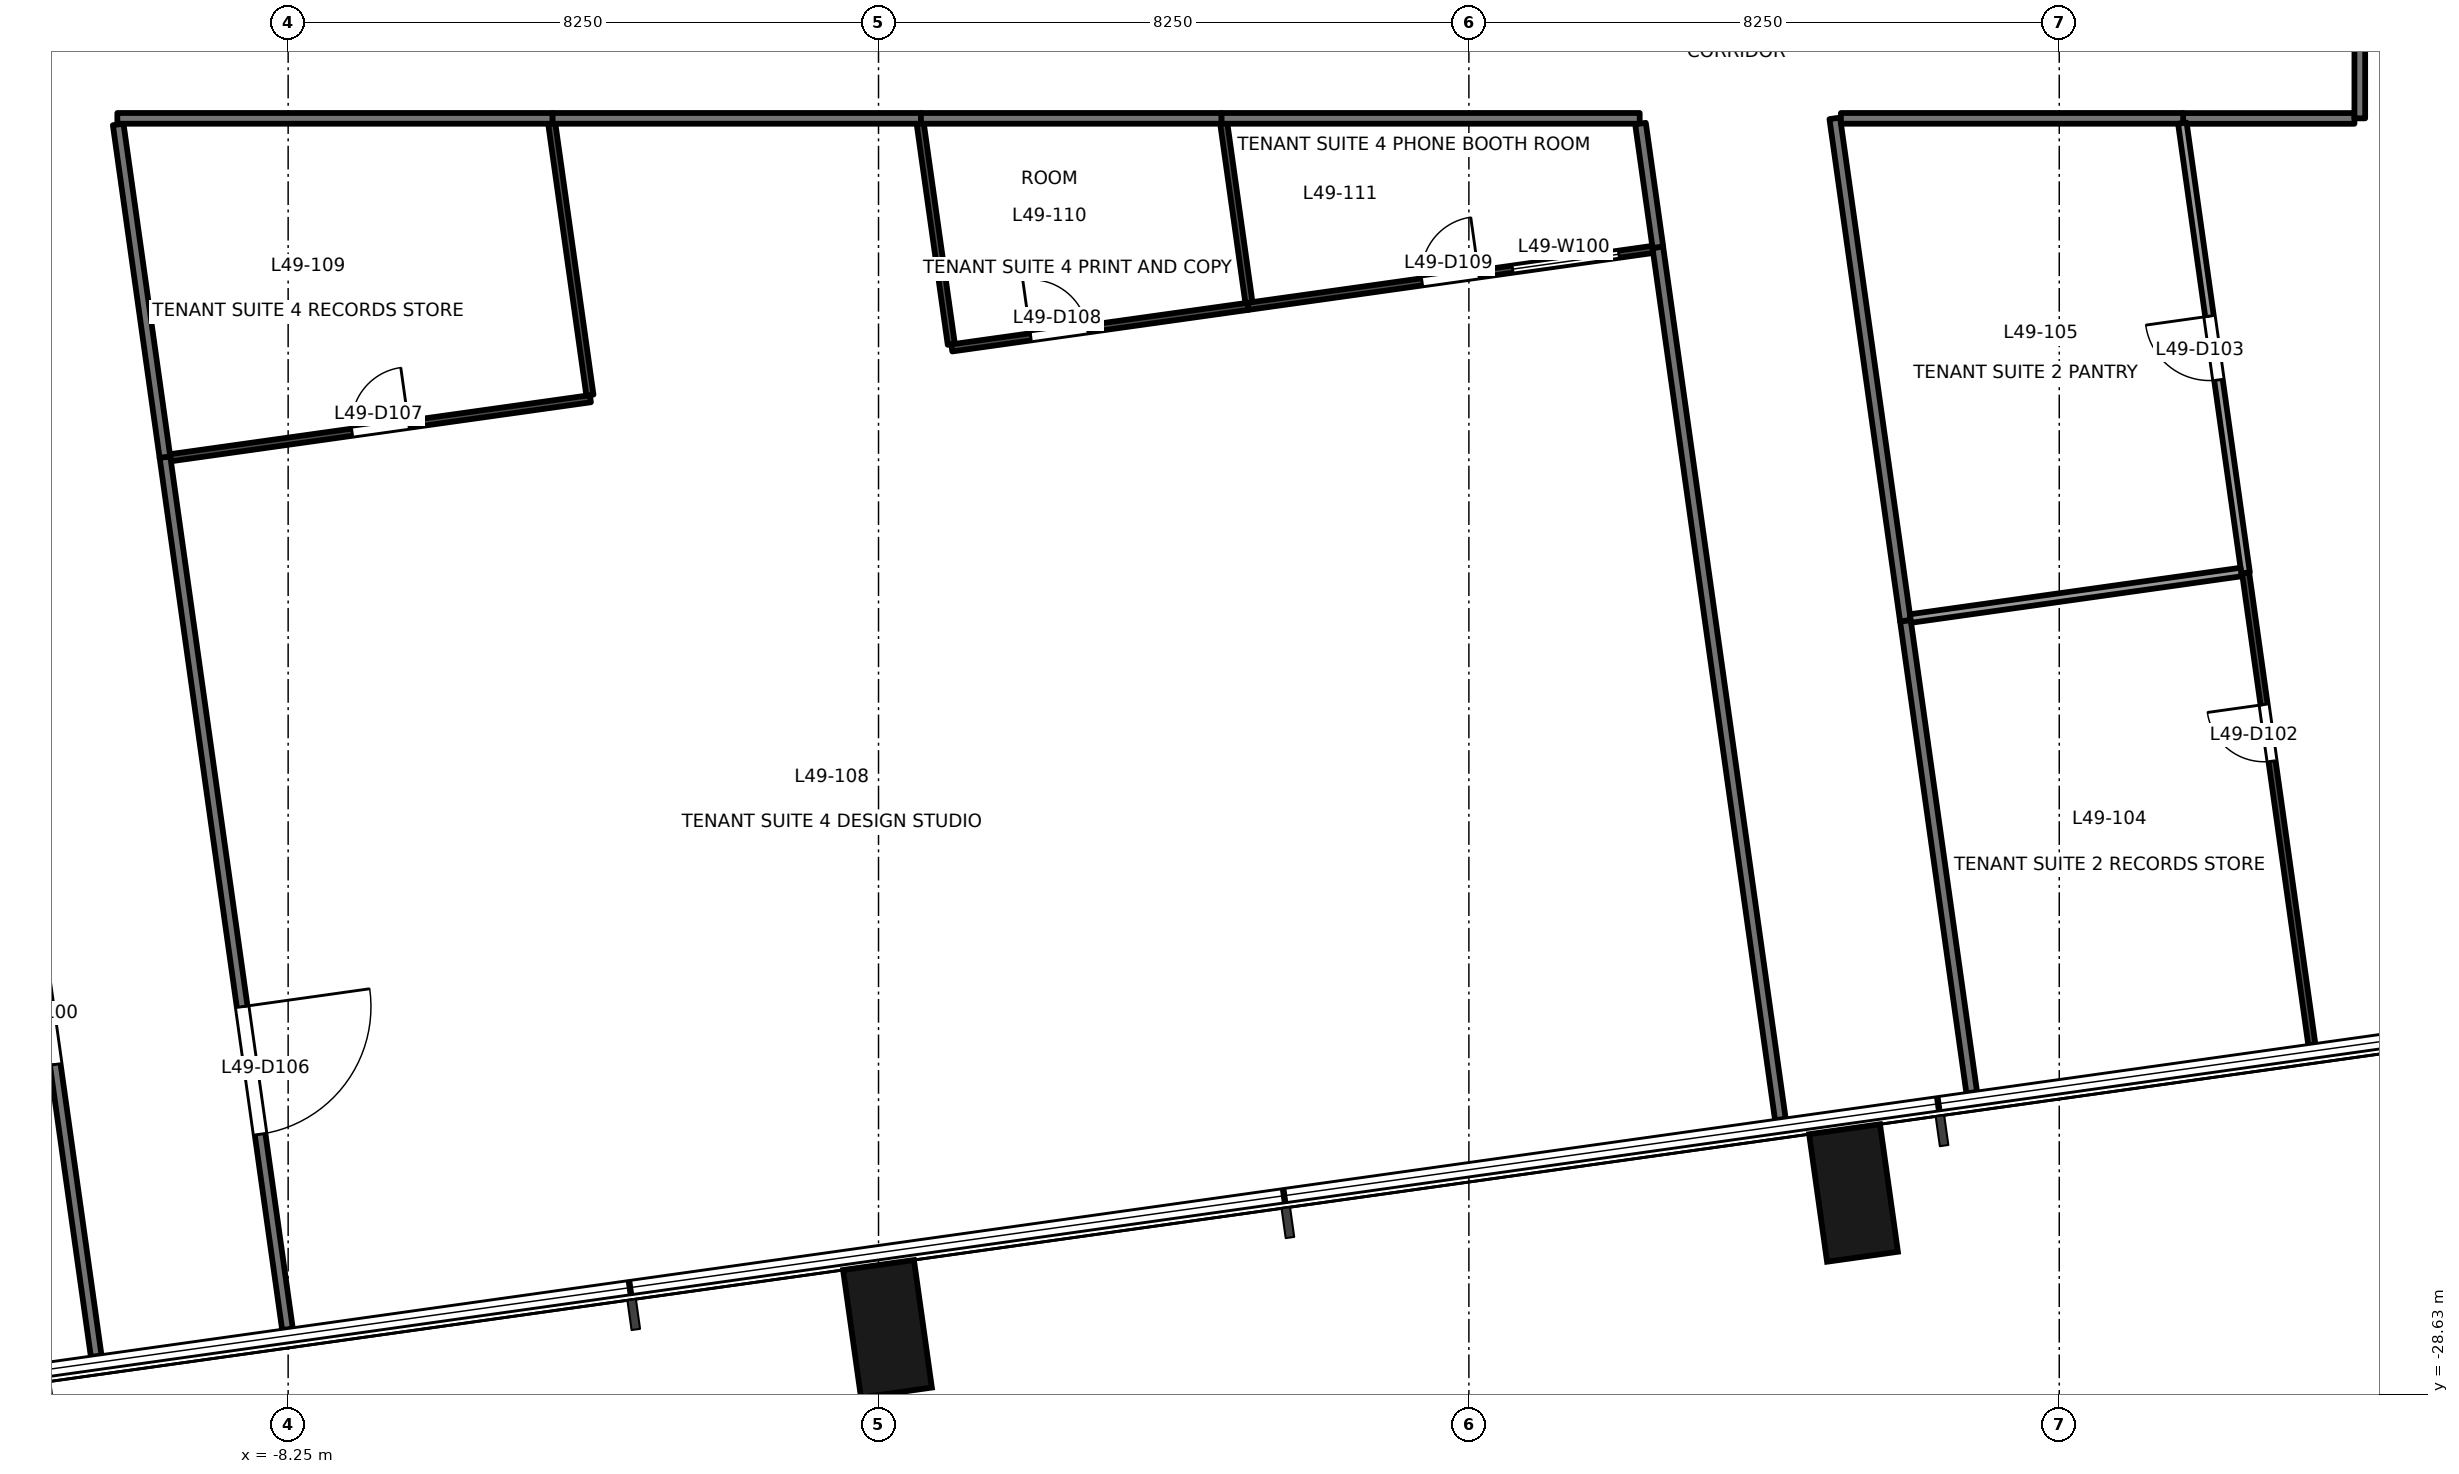
"""IFC4 building model, lengths in metres.
Left out: names, types, materials, properties, quantities, classifications, styles, units other than length and angle.
Written with IfcOpenShell. Run it as: python <this file> out.ifc"""

import sys

from ifc_helpers import new_model, si_unit, direction, frame, frame_2d, origin, origin_2d, place, context, subcontext, project, spatial, rectangle, extrude, element, fill, save


model = new_model("IFC4")
c1 = context("Model", 3, precision=1e-05, world=origin(), true_north=direction((0.0, 1.0)))
c2 = subcontext(c1, "Body", "Model", "MODEL_VIEW")
j1 = project(units=[si_unit("LENGTHUNIT", "METRE"), si_unit("PLANEANGLEUNIT", "RADIAN")], contexts=[c1])
p1 = place(None, origin())
s1 = spatial("IfcSite", under=j1, at=p1, CompositionType="ELEMENT")
p2 = place(p1, origin())
s2 = spatial("IfcBuilding", under=s1, at=p2, CompositionType="ELEMENT")
p3 = place(p2, frame((0.0, 0.0, 217.4)))
s3 = spatial("IfcBuildingStorey", under=s2, at=p3, CompositionType="ELEMENT", Elevation=217.4)
for number, where, z_axis, x_axis in (
    (1, (-11.971, -29.416, -0.2), (0.0, 0.0, 1.0), (0.99, 0.139, 0.0)),
    (2, (0.125, -27.716, -0.2), (0.0, 0.0, 1.0), (0.99, 0.139, 0.0)),
    (3, (13.625, -25.818, -0.2), (0.0, 0.0, 1.0), (0.99, 0.139, 0.0)),
):
    element("IfcColumn", number, at=place(p3, frame(where, z_axis=z_axis, x_axis=x_axis)), inside=s3, PredefinedType="COLUMN", context=c2, shape_type="SweptSolid", body=[
        extrude(rectangle(XDim=1.0, YDim=1.8, at=origin_2d()), origin(), (0.0, 0.0, 1.0), 3.9),
    ])
p4 = place(p3, frame((-10.932, -28.099, 0.0), z_axis=(0.0, 0.0, 1.0), x_axis=(-0.139168963114, 0.990268650269, 0.0)))
e4 = element("IfcWall", 4, at=p4, inside=s3, PredefinedType="PARTITIONING", context=c2, shape_type="SweptSolid", body=[
    extrude(rectangle(XDim=17.469, YDim=0.15, at=frame_2d((8.734, 0.0))), origin(), (0.0, 0.0, 1.0), 3.7),
])
p5 = place(p4, frame((4.117, 0.0, 0.0)))
e5 = element("IfcOpeningElement", 5, at=p5, cuts=e4, PredefinedType="OPENING", context=c2, shape_type="SweptSolid", body=[
    extrude(rectangle(XDim=1.5, YDim=2.1, at=frame_2d((0.75, 1.05))), frame((0.0, 0.085, 0.0), z_axis=(0.0, -1.0, 0.0), x_axis=(1.0, 0.0, 0.0)), (0.0, 0.0, 1.0), 0.171),
])
p6 = place(p3, frame((20.625, -10.801, 0.0), z_axis=(0.0, 0.0, 1.0), x_axis=(-1.0, 0.0, 0.0)))
e6 = element("IfcWall", 6, at=p6, inside=s3, PredefinedType="PARTITIONING", context=c2, shape_type="SweptSolid", body=[
    extrude(rectangle(XDim=2.394, YDim=0.15, at=frame_2d((1.197, 0.0))), origin(), (0.0, 0.0, 1.0), 3.7),
])
p7 = place(p3, frame((20.7, 3.261, 0.0), z_axis=(0.0, 0.0, 1.0), x_axis=(0.0, -1.0, 0.0)))
e7 = element("IfcWall", 7, at=p7, inside=s3, PredefinedType="PARTITIONING", context=c2, shape_type="SweptSolid", body=[
    extrude(rectangle(XDim=14.061, YDim=0.15, at=frame_2d((7.031, 0.0))), origin(), (0.0, 0.0, 1.0), 3.1),
])
p8 = place(p7, frame((3.19, 0.0, 0.0)))
e8 = element("IfcOpeningElement", 8, at=p8, cuts=e7, PredefinedType="OPENING", context=c2, shape_type="SweptSolid", body=[
    extrude(rectangle(XDim=1.8, YDim=2.1, at=frame_2d((0.9, 1.05))), frame((0.0, 0.085, 0.0), z_axis=(0.0, -1.0, 0.0), x_axis=(1.0, 0.0, 0.0)), (0.0, 0.0, 1.0), 0.171),
])
p9 = place(p3, frame((14.35, -17.82, 0.0), z_axis=(0.0, 0.0, 1.0), x_axis=(0.139193607275, -0.99026518655, 0.0)))
e9 = element("IfcWall", 9, at=p9, inside=s3, PredefinedType="PARTITIONING", context=c2, shape_type="SweptSolid", body=[
    extrude(rectangle(XDim=6.66, YDim=0.15, at=frame_2d((3.33, 0.0))), origin(), (0.0, 0.0, 1.0), 3.7),
])
p10 = place(p3, frame((13.363, -10.8, 0.0), z_axis=(0.0, 0.0, 1.0), x_axis=(0.139236890445, -0.990259101619, 0.0)))
e10 = element("IfcWall", 10, at=p10, inside=s3, PredefinedType="PARTITIONING", context=c2, shape_type="SweptSolid", body=[
    extrude(rectangle(XDim=7.089, YDim=0.15, at=frame_2d((3.544, 0.0))), origin(), (0.0, 0.0, 1.0), 2.9),
])
p11 = place(p3, frame((18.231, -10.8, 0.0), z_axis=(0.0, 0.0, 1.0), x_axis=(-1.0, 0.0, 0.0)))
e11 = element("IfcWall", 11, at=p11, inside=s3, PredefinedType="PARTITIONING", context=c2, shape_type="SweptSolid", body=[
    extrude(rectangle(XDim=4.782, YDim=0.15, at=frame_2d((2.391, 0.0))), origin(), (0.0, 0.0, 1.0), 2.9),
])
p12 = place(p3, frame((-9.972, -15.533, 0.0), z_axis=(0.0, 0.0, 1.0), x_axis=(0.139149686673, -0.990271359123, 0.0)))
e12 = element("IfcWall", 12, at=p12, inside=s3, PredefinedType="PARTITIONING", context=c2, shape_type="SweptSolid", body=[
    extrude(rectangle(XDim=12.31, YDim=0.15, at=frame_2d((6.155, 0.0))), origin(), (0.0, 0.0, 1.0), 2.8),
])
p13 = place(p12, frame((7.757, 0.0, 0.0)))
e13 = element("IfcOpeningElement", 13, at=p13, cuts=e12, PredefinedType="OPENING", context=c2, shape_type="SweptSolid", body=[
    extrude(rectangle(XDim=1.8, YDim=2.1, at=frame_2d((0.9, 1.05))), frame((0.0, 0.085, 0.0), z_axis=(0.0, -1.0, 0.0), x_axis=(1.0, 0.0, 0.0)), (0.0, 0.0, 1.0), 0.171),
])
p14 = place(p3, frame((0.593, -10.8, 0.0), z_axis=(0.0, 0.0, 1.0), x_axis=(-1.0, 0.0, 0.0)))
e14 = element("IfcWall", 14, at=p14, inside=s3, PredefinedType="PARTITIONING", context=c2, shape_type="SweptSolid", body=[
    extrude(rectangle(XDim=5.15, YDim=0.15, at=frame_2d((2.575, 0.0))), origin(), (0.0, 0.0, 1.0), 2.8),
])
p15 = place(p3, frame((12.603, -24.791, 0.0), z_axis=(0.0, 0.0, 1.0), x_axis=(-0.139180069817, 0.990267089308, 0.0)))
e15 = element("IfcWall", 15, at=p15, inside=s3, PredefinedType="PARTITIONING", context=c2, shape_type="SweptSolid", body=[
    extrude(rectangle(XDim=12.309, YDim=0.15, at=frame_2d((6.154, 0.0))), origin(), (0.0, 0.0, 1.0), 3.7),
])
p16 = place(p3, frame((-10.625, -10.885, 0.0), z_axis=(0.0, 0.0, 1.0), x_axis=(0.139112996275, -0.990276514044, 0.0)))
e16 = element("IfcWall", 16, at=p16, inside=s3, PredefinedType="PARTITIONING", context=c2, shape_type="SweptSolid", body=[
    extrude(rectangle(XDim=4.695, YDim=0.15, at=frame_2d((2.347, 0.0))), origin(), (0.0, 0.0, 1.0), 3.7),
])
p17 = place(p3, frame((-4.557, -10.8, 0.0), z_axis=(0.0, 0.0, 1.0), x_axis=(-1.0, 0.0, 0.0)))
e17 = element("IfcWall", 17, at=p17, inside=s3, PredefinedType="PARTITIONING", context=c2, shape_type="SweptSolid", body=[
    extrude(rectangle(XDim=6.08, YDim=0.15, at=frame_2d((3.04, 0.0))), origin(), (0.0, 0.0, 1.0), 2.8),
])
p18 = place(p3, frame((4.794, -10.8, 0.0), z_axis=(0.0, 0.0, 1.0), x_axis=(-1.0, 0.0, 0.0)))
e18 = element("IfcWall", 18, at=p18, inside=s3, PredefinedType="PARTITIONING", context=c2, shape_type="SweptSolid", body=[
    extrude(rectangle(XDim=4.201, YDim=0.15, at=frame_2d((2.101, 0.0))), origin(), (0.0, 0.0, 1.0), 2.8),
])
p19 = place(p3, frame((10.637, -10.8, 0.0), z_axis=(0.0, 0.0, 1.0), x_axis=(-1.0, 0.0, 0.0)))
e19 = element("IfcWall", 19, at=p19, inside=s3, PredefinedType="PARTITIONING", context=c2, shape_type="SweptSolid", body=[
    extrude(rectangle(XDim=5.843, YDim=0.15, at=frame_2d((2.921, 0.0))), origin(), (0.0, 0.0, 1.0), 2.8),
])
p20 = place(p3, frame((10.891, -12.601, 0.0), z_axis=(0.0, 0.0, 1.0), x_axis=(-0.139344862723, 0.990243914009, 0.0)))
e20 = element("IfcWall", 20, at=p20, inside=s3, PredefinedType="PARTITIONING", context=c2, shape_type="SweptSolid", body=[
    extrude(rectangle(XDim=1.745, YDim=0.15, at=frame_2d((0.873, 0.0))), origin(), (0.0, 0.0, 1.0), 3.7),
])
p21 = place(p3, frame((20.03, -23.746, 0.0), z_axis=(0.0, 0.0, 1.0), x_axis=(-0.139070003418, 0.990282552683, 0.0)))
e21 = element("IfcWall", 21, at=p21, inside=s3, PredefinedType="PARTITIONING", context=c2, shape_type="SweptSolid", body=[
    extrude(rectangle(XDim=6.659, YDim=0.1, at=frame_2d((3.329, 0.0))), origin(), (0.0, 0.0, 1.0), 3.7),
])
p22 = place(p21, frame((4.001, 0.0, 0.0)))
e22 = element("IfcOpeningElement", 22, at=p22, cuts=e21, PredefinedType="OPENING", context=c2, shape_type="SweptSolid", body=[
    extrude(rectangle(XDim=0.8, YDim=2.1, at=frame_2d((0.4, 1.05))), frame((0.0, 0.061, 0.0), z_axis=(0.0, -1.0, 0.0), x_axis=(1.0, 0.0, 0.0)), (0.0, 0.0, 1.0), 0.121),
])
p23 = place(p3, frame((19.104, -17.152, 0.0), z_axis=(0.0, 0.0, 1.0), x_axis=(-0.139283120935, 0.99025260021, 0.0)))
e23 = element("IfcWall", 23, at=p23, inside=s3, PredefinedType="PARTITIONING", context=c2, shape_type="SweptSolid", body=[
    extrude(rectangle(XDim=6.347, YDim=0.12, at=frame_2d((3.173, 0.0))), origin(), (0.0, 0.0, 1.0), 3.7),
])
p24 = place(p23, frame((2.723, 0.0, 0.0)))
e24 = element("IfcOpeningElement", 24, at=p24, cuts=e23, PredefinedType="OPENING", context=c2, shape_type="SweptSolid", body=[
    extrude(rectangle(XDim=0.9, YDim=2.1, at=frame_2d((0.45, 1.05))), frame((0.0, 0.071, 0.0), z_axis=(0.0, -1.0, 0.0), x_axis=(1.0, 0.0, 0.0)), (0.0, 0.0, 1.0), 0.141),
])
p25 = place(p3, frame((14.421, -17.79, 0.0), z_axis=(0.0, 0.0, 1.0), x_axis=(0.990243495755, 0.139347834982, 0.0)))
e25 = element("IfcWall", 25, at=p25, inside=s3, PredefinedType="PARTITIONING", context=c2, shape_type="SweptSolid", body=[
    extrude(rectangle(XDim=4.666, YDim=0.12, at=frame_2d((2.333, 0.0))), origin(), (0.0, 0.0, 1.0), 3.7),
])
p26 = place(p3, frame((-9.895, -15.543, 0.0), z_axis=(0.0, 0.0, 1.0), x_axis=(0.990265807236, 0.139189191458, 0.0)))
e26 = element("IfcWall", 26, at=p26, inside=s3, PredefinedType="PARTITIONING", context=c2, shape_type="SweptSolid", body=[
    extrude(rectangle(XDim=5.927, YDim=0.1, at=frame_2d((2.963, 0.0))), origin(), (0.0, 0.0, 1.0), 2.8),
])
p27 = place(p26, frame((2.563, 0.0, 0.0)))
e27 = element("IfcOpeningElement", 27, at=p27, cuts=e26, PredefinedType="OPENING", context=c2, shape_type="SweptSolid", body=[
    extrude(rectangle(XDim=0.8, YDim=2.1, at=frame_2d((0.4, 1.05))), frame((0.0, 0.061, 0.0), z_axis=(0.0, -1.0, 0.0), x_axis=(1.0, 0.0, 0.0)), (0.0, 0.0, 1.0), 0.121),
])
p28 = place(p3, frame((-4.033, -14.668, 0.0), z_axis=(0.0, 0.0, 1.0), x_axis=(-0.139140777399, 0.990272610984, 0.0)))
e28 = element("IfcWall", 28, at=p28, inside=s3, PredefinedType="PARTITIONING", context=c2, shape_type="SweptSolid", body=[
    extrude(rectangle(XDim=3.837, YDim=0.1, at=frame_2d((1.919, 0.0))), origin(), (0.0, 0.0, 1.0), 2.8),
])
p29 = place(p3, frame((0.582, -10.868, 0.0), z_axis=(0.0, 0.0, 1.0), x_axis=(0.139416658497, -0.990233808418, 0.0)))
e29 = element("IfcWall", 29, at=p29, inside=s3, PredefinedType="PARTITIONING", context=c2, shape_type="SweptSolid", body=[
    extrude(rectangle(XDim=3.121, YDim=0.1, at=frame_2d((1.56, 0.0))), origin(), (0.0, 0.0, 1.0), 3.7),
])
p30 = place(p3, frame((1.024, -14.008, 0.0), z_axis=(0.0, 0.0, 1.0), x_axis=(0.990290027482, 0.139016766864, 0.0)))
e30 = element("IfcWall", 30, at=p30, inside=s3, PredefinedType="PARTITIONING", context=c2, shape_type="SweptSolid", body=[
    extrude(rectangle(XDim=4.18, YDim=0.1, at=frame_2d((2.09, 0.0))), origin(), (0.0, 0.0, 1.0), 2.8),
])
p31 = place(p30, frame((1.114, 0.0, 0.0)))
e31 = element("IfcOpeningElement", 31, at=p31, cuts=e30, PredefinedType="OPENING", context=c2, shape_type="SweptSolid", body=[
    extrude(rectangle(XDim=0.8, YDim=2.1, at=frame_2d((0.4, 1.05))), frame((0.0, 0.061, 0.0), z_axis=(0.0, -1.0, 0.0), x_axis=(1.0, 0.0, 0.0)), (0.0, 0.0, 1.0), 0.121),
])
p32 = place(p3, frame((5.163, -13.427, 0.0), z_axis=(0.0, 0.0, 1.0), x_axis=(0.9902675357, 0.139176893695, 0.0)))
e32 = element("IfcWall", 32, at=p32, inside=s3, PredefinedType="PARTITIONING", context=c2, shape_type="SweptSolid", body=[
    extrude(rectangle(XDim=5.712, YDim=0.1, at=frame_2d((2.856, 0.0))), origin(), (0.0, 0.0, 1.0), 2.8),
])
p33 = place(p32, frame((2.456, 0.0, 0.0)))
e33 = element("IfcOpeningElement", 33, at=p33, cuts=e32, PredefinedType="OPENING", context=c2, shape_type="SweptSolid", body=[
    extrude(rectangle(XDim=0.8, YDim=2.1, at=frame_2d((0.4, 1.05))), frame((0.0, 0.061, 0.0), z_axis=(0.0, -1.0, 0.0), x_axis=(1.0, 0.0, 0.0)), (0.0, 0.0, 1.0), 0.121),
])
p34 = place(p32, frame((3.734, 0.0, 0.9)))
e34 = element("IfcOpeningElement", 34, at=p34, cuts=e32, PredefinedType="OPENING", context=c2, shape_type="SweptSolid", body=[
    extrude(rectangle(XDim=1.5, YDim=1.2, at=frame_2d((0.75, 0.6))), frame((0.0, 0.061, 0.0), z_axis=(0.0, -1.0, 0.0), x_axis=(1.0, 0.0, 0.0)), (0.0, 0.0, 1.0), 0.121),
])
p35 = place(p3, frame((4.824, -10.868, 0.0), z_axis=(0.0, 0.0, 1.0), x_axis=(0.139111451168, -0.990276731098, 0.0)))
e35 = element("IfcWall", 35, at=p35, inside=s3, PredefinedType="PARTITIONING", context=c2, shape_type="SweptSolid", body=[
    extrude(rectangle(XDim=2.531, YDim=0.1, at=frame_2d((1.265, 0.0))), origin(), (0.0, 0.0, 1.0), 3.7),
])
p36 = place(p5, origin())
e36 = element("IfcDoor", 36, at=p36, inside=s3, OperationType="DOUBLE_DOOR_SINGLE_SWING", PredefinedType="DOOR", context=c2, shape_type="SweptSolid", body=[
    extrude(rectangle(XDim=1.5, YDim=2.1, at=frame_2d((0.75, 1.05))), frame((0.0, 0.025, 0.0), z_axis=(0.0, -1.0, 0.0), x_axis=(1.0, 0.0, 0.0)), (0.0, 0.0, 1.0), 0.05),
])
fill(e5, e36)
p37 = place(p22, origin())
e37 = element("IfcDoor", 37, at=p37, inside=s3, OperationType="SINGLE_SWING_RIGHT", PredefinedType="DOOR", context=c2, shape_type="SweptSolid", body=[
    extrude(rectangle(XDim=0.8, YDim=2.1, at=frame_2d((0.4, 1.05))), frame((0.0, 0.025, 0.0), z_axis=(0.0, -1.0, 0.0), x_axis=(1.0, 0.0, 0.0)), (0.0, 0.0, 1.0), 0.05),
])
fill(e22, e37)
p38 = place(p24, origin())
e38 = element("IfcDoor", 38, at=p38, inside=s3, OperationType="SINGLE_SWING_RIGHT", PredefinedType="DOOR", context=c2, shape_type="SweptSolid", body=[
    extrude(rectangle(XDim=0.9, YDim=2.1, at=frame_2d((0.45, 1.05))), frame((0.0, 0.025, 0.0), z_axis=(0.0, -1.0, 0.0), x_axis=(1.0, 0.0, 0.0)), (0.0, 0.0, 1.0), 0.05),
])
fill(e24, e38)
p39 = place(p13, origin())
e39 = element("IfcDoor", 39, at=p39, inside=s3, OperationType="DOUBLE_DOOR_SINGLE_SWING", PredefinedType="DOOR", context=c2, shape_type="SweptSolid", body=[
    extrude(rectangle(XDim=1.8, YDim=2.1, at=frame_2d((0.9, 1.05))), frame((0.0, 0.025, 0.0), z_axis=(0.0, -1.0, 0.0), x_axis=(1.0, 0.0, 0.0)), (0.0, 0.0, 1.0), 0.05),
])
fill(e13, e39)
p40 = place(p27, origin())
e40 = element("IfcDoor", 40, at=p40, inside=s3, OperationType="SINGLE_SWING_RIGHT", PredefinedType="DOOR", context=c2, shape_type="SweptSolid", body=[
    extrude(rectangle(XDim=0.8, YDim=2.1, at=frame_2d((0.4, 1.05))), frame((0.0, 0.025, 0.0), z_axis=(0.0, -1.0, 0.0), x_axis=(1.0, 0.0, 0.0)), (0.0, 0.0, 1.0), 0.05),
])
fill(e27, e40)
p41 = place(p31, origin())
e41 = element("IfcDoor", 41, at=p41, inside=s3, OperationType="SINGLE_SWING_LEFT", PredefinedType="DOOR", context=c2, shape_type="SweptSolid", body=[
    extrude(rectangle(XDim=0.8, YDim=2.1, at=frame_2d((0.4, 1.05))), frame((0.0, 0.025, 0.0), z_axis=(0.0, -1.0, 0.0), x_axis=(1.0, 0.0, 0.0)), (0.0, 0.0, 1.0), 0.05),
])
fill(e31, e41)
p42 = place(p33, origin())
e42 = element("IfcDoor", 42, at=p42, inside=s3, OperationType="SINGLE_SWING_RIGHT", PredefinedType="DOOR", context=c2, shape_type="SweptSolid", body=[
    extrude(rectangle(XDim=0.8, YDim=2.1, at=frame_2d((0.4, 1.05))), frame((0.0, 0.025, 0.0), z_axis=(0.0, -1.0, 0.0), x_axis=(1.0, 0.0, 0.0)), (0.0, 0.0, 1.0), 0.05),
])
fill(e33, e42)
p43 = place(p34, origin())
e43 = element("IfcWindow", 43, at=p43, inside=s3, PartitioningType="SINGLE_PANEL", PredefinedType="WINDOW", context=c2, shape_type="SweptSolid", body=[
    extrude(rectangle(XDim=1.5, YDim=1.2, at=frame_2d((0.75, 0.6))), frame((0.0, 0.03, 0.0), z_axis=(0.0, -1.0, 0.0), x_axis=(1.0, 0.0, 0.0)), (0.0, 0.0, 1.0), 0.06),
])
fill(e34, e43)
save(model, sys.argv[1])
